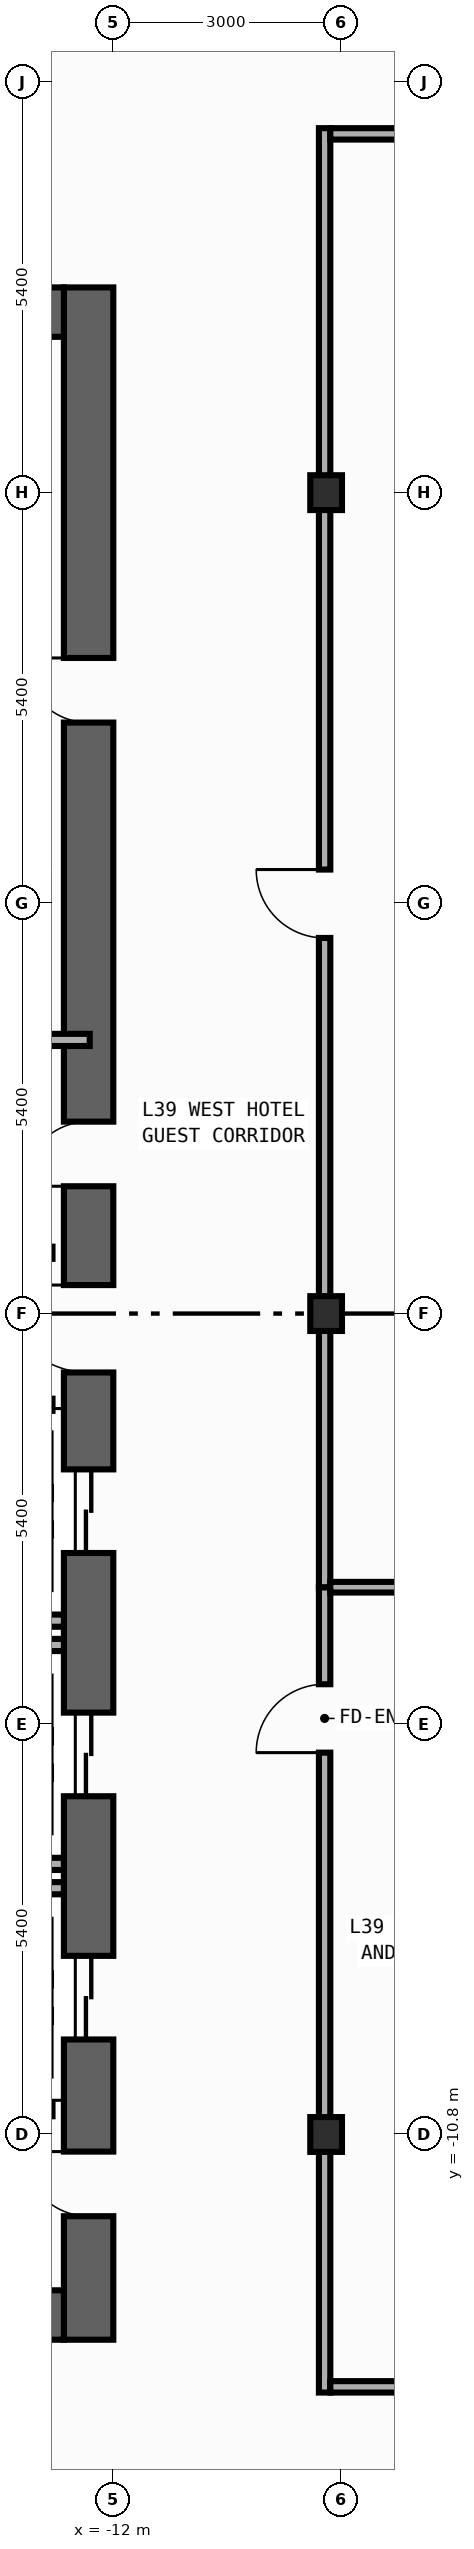
"""IFC4 building model, lengths in metres.
Left out: names, types, materials, properties, quantities, classifications, styles, units other than length and angle.
Written with IfcOpenShell. Run it as: python <this file> out.ifc"""

import sys

from ifc_helpers import new_model, si_unit, direction, frame, frame_2d, origin, origin_2d, place, context, subcontext, project, spatial, rectangle, i_section, extrude, element, fill, save


model = new_model("IFC4")
c1 = context("Model", 3, precision=1e-05, world=origin(), true_north=direction((0.0, 1.0)))
c2 = subcontext(c1, "Body", "Model", "MODEL_VIEW")
j1 = project(units=[si_unit("LENGTHUNIT", "METRE"), si_unit("PLANEANGLEUNIT", "RADIAN")], contexts=[c1])
p1 = place(None, origin())
s1 = spatial("IfcSite", under=j1, at=p1, CompositionType="ELEMENT")
p2 = place(p1, origin())
s2 = spatial("IfcBuilding", under=s1, at=p2, CompositionType="ELEMENT")
p3 = place(p2, frame((0.0, 0.0, 172.6)))
s3 = spatial("IfcBuildingStorey", under=s2, at=p3, CompositionType="ELEMENT", Elevation=172.6)
p4 = place(p3, frame((-12.325, -13.5, 0.0), z_axis=(0.0, 0.0, 1.0), x_axis=(0.0, 1.0, 0.0)))
e1 = element("IfcWall", 1, at=p4, inside=s3, PredefinedType="SHEAR", context=c2, shape_type="SweptSolid", body=[
    extrude(rectangle(XDim=27.0, YDim=0.65, at=frame_2d((13.5, 0.0))), origin(), (0.0, 0.0, 1.0), 3.54),
])
p5 = place(p4, frame((10.35, 0.0, 0.0)))
e2 = element("IfcOpeningElement", 2, at=p5, cuts=e1, PredefinedType="OPENING", context=c2, shape_type="SweptSolid", body=[
    extrude(rectangle(XDim=1.1, YDim=2.2, at=frame_2d((0.55, 1.1))), frame((0.0, 0.335, 0.0), z_axis=(0.0, -1.0, 0.0), x_axis=(1.0, 0.0, 0.0)), (0.0, 0.0, 1.0), 0.67),
])
p6 = place(p4, frame((7.15, 0.0, 0.0)))
e3 = element("IfcOpeningElement", 3, at=p6, cuts=e1, PredefinedType="OPENING", context=c2, shape_type="SweptSolid", body=[
    extrude(rectangle(XDim=1.1, YDim=2.2, at=frame_2d((0.55, 1.1))), frame((0.0, 0.335, 0.0), z_axis=(0.0, -1.0, 0.0), x_axis=(1.0, 0.0, 0.0)), (0.0, 0.0, 1.0), 0.67),
])
p7 = place(p4, frame((3.95, 0.0, 0.0)))
e4 = element("IfcOpeningElement", 4, at=p7, cuts=e1, PredefinedType="OPENING", context=c2, shape_type="SweptSolid", body=[
    extrude(rectangle(XDim=1.1, YDim=2.2, at=frame_2d((0.55, 1.1))), frame((0.0, 0.335, 0.0), z_axis=(0.0, -1.0, 0.0), x_axis=(1.0, 0.0, 0.0)), (0.0, 0.0, 1.0), 0.67),
])
p8 = place(p4, frame((15.175, 0.0, 0.0)))
e5 = element("IfcOpeningElement", 5, at=p8, cuts=e1, PredefinedType="OPENING", context=c2, shape_type="SweptSolid", body=[
    extrude(rectangle(XDim=0.85, YDim=2.1, at=frame_2d((0.425, 1.05))), frame((0.0, 0.335, 0.0), z_axis=(0.0, -1.0, 0.0), x_axis=(1.0, 0.0, 0.0)), (0.0, 0.0, 1.0), 0.67),
])
p9 = place(p4, frame((21.275, 0.0, 0.0)))
e6 = element("IfcOpeningElement", 6, at=p9, cuts=e1, PredefinedType="OPENING", context=c2, shape_type="SweptSolid", body=[
    extrude(rectangle(XDim=0.85, YDim=2.1, at=frame_2d((0.425, 1.05))), frame((0.0, 0.335, 0.0), z_axis=(0.0, -1.0, 0.0), x_axis=(1.0, 0.0, 0.0)), (0.0, 0.0, 1.0), 0.67),
])
p10 = place(p4, frame((12.725, 0.0, 0.0)))
e7 = element("IfcOpeningElement", 7, at=p10, cuts=e1, PredefinedType="OPENING", context=c2, shape_type="SweptSolid", body=[
    extrude(rectangle(XDim=1.15, YDim=2.2, at=frame_2d((0.575, 1.1))), frame((0.0, 0.335, 0.0), z_axis=(0.0, -1.0, 0.0), x_axis=(1.0, 0.0, 0.0)), (0.0, 0.0, 1.0), 0.67),
])
p11 = place(p4, frame((1.625, 0.0, 0.0)))
e8 = element("IfcOpeningElement", 8, at=p11, cuts=e1, PredefinedType="OPENING", context=c2, shape_type="SweptSolid", body=[
    extrude(rectangle(XDim=0.85, YDim=2.1, at=frame_2d((0.425, 1.05))), frame((0.0, 0.335, 0.0), z_axis=(0.0, -1.0, 0.0), x_axis=(1.0, 0.0, 0.0)), (0.0, 0.0, 1.0), 0.67),
])
for number, where, z_axis, x_axis in (
    (9, (-19.75, -13.175, 0.0), (0.0, 0.0, 1.0), (1.0, 0.0, 0.0)),
    (10, (-19.75, 13.175, 0.0), (0.0, 0.0, 1.0), (1.0, 0.0, 0.0)),
):
    element("IfcWall", number, at=place(p3, frame(where, z_axis=z_axis, x_axis=x_axis)), inside=s3, PredefinedType="SHEAR", context=c2, shape_type="SweptSolid", body=[
        extrude(rectangle(XDim=7.1, YDim=0.65, at=frame_2d((3.55, 0.0))), origin(), (0.0, 0.0, 1.0), 3.54),
    ])
for number, where, z_axis, x_axis in (
    (11, (-9.2, -10.8, 0.0), (0.0, 0.0, 1.0), (1.0, 0.0, 0.0)),
    (12, (-9.2, 0.0, 0.0), (0.0, 0.0, 1.0), (1.0, 0.0, 0.0)),
    (13, (-9.2, 10.8, 0.0), (0.0, 0.0, 1.0), (1.0, 0.0, 0.0)),
):
    element("IfcColumn", number, at=place(p3, frame(where, z_axis=z_axis, x_axis=x_axis)), inside=s3, PredefinedType="COLUMN", context=c2, shape_type="SweptSolid", body=[
        extrude(i_section(OverallWidth=0.417, OverallDepth=0.458, WebThickness=0.03, FlangeThickness=0.05, FilletRadius=0.022, at=origin_2d()), origin(), (0.0, 0.0, 1.0), 3.8),
    ])
for number, where, z_axis, x_axis in (
    (14, (-14.99, -4.04, 0.0), (0.0, 0.0, 1.0), (1.0, 0.0, 0.0)),
    (15, (-14.99, -7.24, 0.0), (0.0, 0.0, 1.0), (1.0, 0.0, 0.0)),
    (16, (-14.99, -4.36, 0.0), (0.0, 0.0, 1.0), (1.0, 0.0, 0.0)),
    (17, (-14.99, -7.56, 0.0), (0.0, 0.0, 1.0), (1.0, 0.0, 0.0)),
):
    element("IfcWall", number, at=place(p3, frame(where, z_axis=z_axis, x_axis=x_axis)), inside=s3, PredefinedType="STANDARD", context=c2, shape_type="SweptSolid", body=[
        extrude(rectangle(XDim=2.34, YDim=0.16, at=frame_2d((1.17, 0.0))), origin(), (0.0, 0.0, 1.0), 3.54),
    ])
p12 = place(p3, frame((-15.375, 3.6, 0.0), z_axis=(0.0, 0.0, 1.0), x_axis=(1.0, 0.0, 0.0)))
e18 = element("IfcWall", 18, at=p12, inside=s3, PredefinedType="PARTITIONING", context=c2, shape_type="SweptSolid", body=[
    extrude(rectangle(XDim=3.065, YDim=0.16, at=frame_2d((1.532, 0.0))), origin(), (0.0, 0.0, 1.0), 3.54),
])
p13 = place(p3, frame((-9.22, -14.195, 0.0), z_axis=(0.0, 0.0, 1.0), x_axis=(0.0, 1.0, 0.0)))
e19 = element("IfcWall", 19, at=p13, inside=s3, PredefinedType="PARTITIONING", context=c2, shape_type="SweptSolid", body=[
    extrude(rectangle(XDim=10.595, YDim=0.15, at=frame_2d((5.297, 0.0))), origin(), (0.0, 0.0, 1.0), 2.952),
])
p14 = place(p13, frame((8.419, 0.0, 0.0)))
e20 = element("IfcOpeningElement", 20, at=p14, cuts=e19, PredefinedType="OPENING", context=c2, shape_type="SweptSolid", body=[
    extrude(rectangle(XDim=0.9, YDim=2.15, at=frame_2d((0.45, 1.075))), frame((0.0, 0.085, 0.0), z_axis=(0.0, -1.0, 0.0), x_axis=(1.0, 0.0, 0.0)), (0.0, 0.0, 1.0), 0.17),
])
p15 = place(p3, frame((-9.22, -3.6, 0.0), z_axis=(0.0, 0.0, 1.0), x_axis=(0.0, 1.0, 0.0)))
e21 = element("IfcWall", 21, at=p15, inside=s3, PredefinedType="PARTITIONING", context=c2, shape_type="SweptSolid", body=[
    extrude(rectangle(XDim=19.195, YDim=0.15, at=frame_2d((9.598, 0.0))), origin(), (0.0, 0.0, 1.0), 2.952),
])
p16 = place(p15, frame((8.542, 0.0, 0.0)))
e22 = element("IfcOpeningElement", 22, at=p16, cuts=e21, PredefinedType="OPENING", context=c2, shape_type="SweptSolid", body=[
    extrude(rectangle(XDim=0.9, YDim=2.15, at=frame_2d((0.45, 1.075))), frame((0.0, 0.085, 0.0), z_axis=(0.0, -1.0, 0.0), x_axis=(1.0, 0.0, 0.0)), (0.0, 0.0, 1.0), 0.17),
])
p17 = place(p3, frame((-9.145, 15.52, 0.0), z_axis=(0.0, 0.0, 1.0), x_axis=(1.0, 0.0, 0.0)))
e23 = element("IfcWall", 23, at=p17, inside=s3, PredefinedType="PARTITIONING", context=c2, shape_type="SweptSolid", body=[
    extrude(rectangle(XDim=18.29, YDim=0.15, at=frame_2d((9.145, 0.0))), origin(), (0.0, 0.0, 1.0), 3.54),
])
p18 = place(p17, frame((15.725, 0.0, 0.0)))
e24 = element("IfcOpeningElement", 24, at=p18, cuts=e23, PredefinedType="OPENING", context=c2, shape_type="SweptSolid", body=[
    extrude(rectangle(XDim=0.9, YDim=2.15, at=frame_2d((0.45, 1.075))), frame((0.0, 0.085, 0.0), z_axis=(0.0, -1.0, 0.0), x_axis=(1.0, 0.0, 0.0)), (0.0, 0.0, 1.0), 0.17),
])
p19 = place(p3, frame((-9.145, -14.12, 0.0), z_axis=(0.0, 0.0, 1.0), x_axis=(1.0, 0.0, 0.0)))
e25 = element("IfcWall", 25, at=p19, inside=s3, PredefinedType="PARTITIONING", context=c2, shape_type="SweptSolid", body=[
    extrude(rectangle(XDim=3.025, YDim=0.15, at=frame_2d((1.512, 0.0))), origin(), (0.0, 0.0, 1.0), 3.54),
])
p20 = place(p19, frame((1.665, 0.0, 0.0)))
e26 = element("IfcOpeningElement", 26, at=p20, cuts=e25, PredefinedType="OPENING", context=c2, shape_type="SweptSolid", body=[
    extrude(rectangle(XDim=0.9, YDim=2.15, at=frame_2d((0.45, 1.075))), frame((0.0, 0.085, 0.0), z_axis=(0.0, -1.0, 0.0), x_axis=(1.0, 0.0, 0.0)), (0.0, 0.0, 1.0), 0.17),
])
p21 = place(p3, frame((-9.145, -3.6, 0.0), z_axis=(0.0, 0.0, 1.0), x_axis=(1.0, 0.0, 0.0)))
e27 = element("IfcWall", 27, at=p21, inside=s3, PredefinedType="PARTITIONING", context=c2, shape_type="SweptSolid", body=[
    extrude(rectangle(XDim=3.025, YDim=0.14, at=frame_2d((1.512, 0.0))), origin(), (0.0, 0.0, 1.0), 3.54),
])
p22 = place(p5, origin())
e28 = element("IfcDoor", 28, at=p22, inside=s3, OperationType="DOUBLE_DOOR_SLIDING", PredefinedType="DOOR", context=c2, shape_type="SweptSolid", body=[
    extrude(rectangle(XDim=1.1, YDim=2.2, at=frame_2d((0.55, 1.1))), frame((0.0, 0.025, 0.0), z_axis=(0.0, -1.0, 0.0), x_axis=(1.0, 0.0, 0.0)), (0.0, 0.0, 1.0), 0.05),
])
fill(e2, e28)
p23 = place(p6, origin())
e29 = element("IfcDoor", 29, at=p23, inside=s3, OperationType="DOUBLE_DOOR_SLIDING", PredefinedType="DOOR", context=c2, shape_type="SweptSolid", body=[
    extrude(rectangle(XDim=1.1, YDim=2.2, at=frame_2d((0.55, 1.1))), frame((0.0, 0.025, 0.0), z_axis=(0.0, -1.0, 0.0), x_axis=(1.0, 0.0, 0.0)), (0.0, 0.0, 1.0), 0.05),
])
fill(e3, e29)
p24 = place(p7, origin())
e30 = element("IfcDoor", 30, at=p24, inside=s3, OperationType="DOUBLE_DOOR_SLIDING", PredefinedType="DOOR", context=c2, shape_type="SweptSolid", body=[
    extrude(rectangle(XDim=1.1, YDim=2.2, at=frame_2d((0.55, 1.1))), frame((0.0, 0.025, 0.0), z_axis=(0.0, -1.0, 0.0), x_axis=(1.0, 0.0, 0.0)), (0.0, 0.0, 1.0), 0.05),
])
fill(e4, e30)
p25 = place(p8, origin())
e31 = element("IfcDoor", 31, at=p25, inside=s3, OperationType="SINGLE_SWING_LEFT", PredefinedType="DOOR", context=c2, shape_type="SweptSolid", body=[
    extrude(rectangle(XDim=0.85, YDim=2.1, at=frame_2d((0.425, 1.05))), frame((0.0, 0.025, 0.0), z_axis=(0.0, -1.0, 0.0), x_axis=(1.0, 0.0, 0.0)), (0.0, 0.0, 1.0), 0.05),
])
fill(e5, e31)
p26 = place(p9, origin())
e32 = element("IfcDoor", 32, at=p26, inside=s3, OperationType="SINGLE_SWING_RIGHT", PredefinedType="DOOR", context=c2, shape_type="SweptSolid", body=[
    extrude(rectangle(XDim=0.85, YDim=2.1, at=frame_2d((0.425, 1.05))), frame((0.0, 0.025, 0.0), z_axis=(0.0, -1.0, 0.0), x_axis=(1.0, 0.0, 0.0)), (0.0, 0.0, 1.0), 0.05),
])
fill(e6, e32)
p27 = place(p10, origin())
e33 = element("IfcDoor", 33, at=p27, inside=s3, OperationType="SINGLE_SWING_RIGHT", PredefinedType="DOOR", context=c2, shape_type="SweptSolid", body=[
    extrude(rectangle(XDim=1.15, YDim=2.2, at=frame_2d((0.575, 1.1))), frame((0.0, 0.025, 0.0), z_axis=(0.0, -1.0, 0.0), x_axis=(1.0, 0.0, 0.0)), (0.0, 0.0, 1.0), 0.05),
])
fill(e7, e33)
p28 = place(p11, origin())
e34 = element("IfcDoor", 34, at=p28, inside=s3, OperationType="SINGLE_SWING_RIGHT", PredefinedType="DOOR", context=c2, shape_type="SweptSolid", body=[
    extrude(rectangle(XDim=0.85, YDim=2.1, at=frame_2d((0.425, 1.05))), frame((0.0, 0.025, 0.0), z_axis=(0.0, -1.0, 0.0), x_axis=(1.0, 0.0, 0.0)), (0.0, 0.0, 1.0), 0.05),
])
fill(e8, e34)
p29 = place(p14, origin())
e35 = element("IfcDoor", 35, at=p29, inside=s3, OperationType="SINGLE_SWING_LEFT", PredefinedType="DOOR", context=c2, shape_type="SweptSolid", body=[
    extrude(rectangle(XDim=0.9, YDim=2.15, at=frame_2d((0.45, 1.075))), frame((0.0, 0.025, 0.0), z_axis=(0.0, -1.0, 0.0), x_axis=(1.0, 0.0, 0.0)), (0.0, 0.0, 1.0), 0.05),
])
fill(e20, e35)
p30 = place(p16, origin())
e36 = element("IfcDoor", 36, at=p30, inside=s3, OperationType="SINGLE_SWING_RIGHT", PredefinedType="DOOR", context=c2, shape_type="SweptSolid", body=[
    extrude(rectangle(XDim=0.9, YDim=2.15, at=frame_2d((0.45, 1.075))), frame((0.0, 0.025, 0.0), z_axis=(0.0, -1.0, 0.0), x_axis=(1.0, 0.0, 0.0)), (0.0, 0.0, 1.0), 0.05),
])
fill(e22, e36)
save(model, sys.argv[1])
